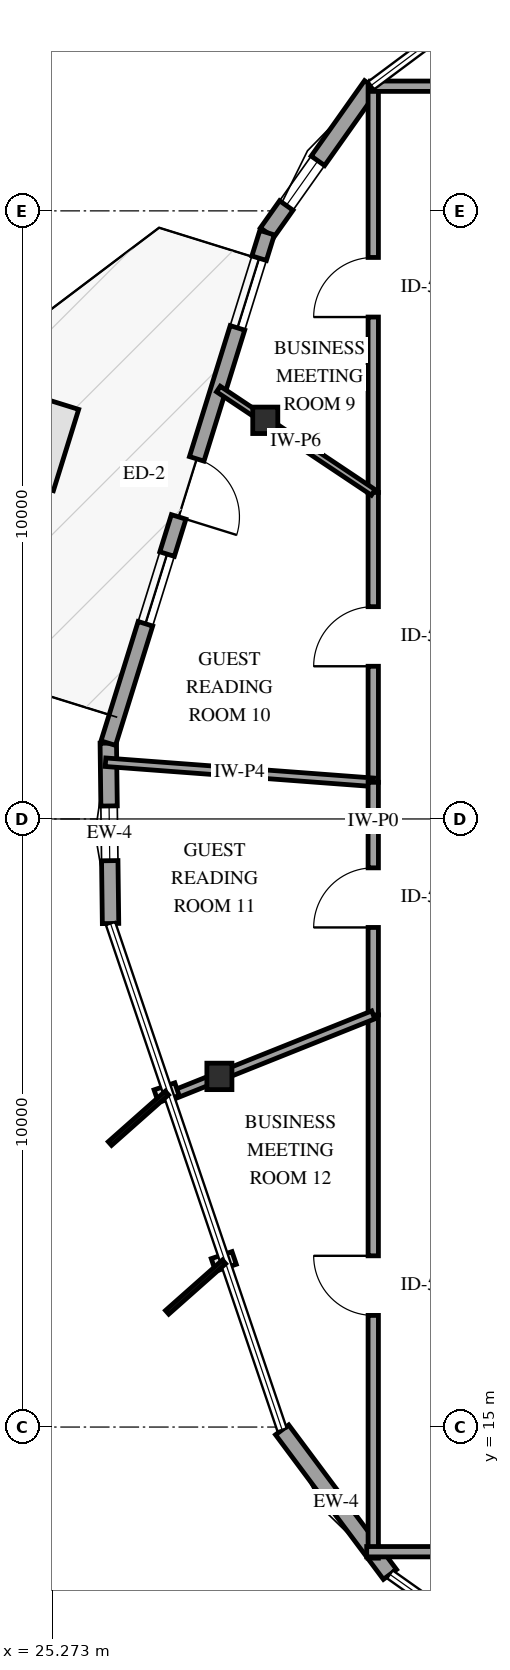
"""IFC4 building model, lengths in metres.
Left out: names, types, materials, properties, quantities, classifications, styles, units other than length and angle.
Written with IfcOpenShell. Run it as: python <this file> out.ifc"""

import sys

from ifc_helpers import new_model, si_unit, direction, frame, frame_2d, origin, origin_2d, place, context, subcontext, project, spatial, rectangle, i_section, extrude, element, fill, save


model = new_model("IFC4")
c1 = context("Model", 3, precision=1e-05, world=origin(), true_north=direction((0.0, 1.0)))
c2 = subcontext(c1, "Body", "Model", "MODEL_VIEW")
j1 = project(units=[si_unit("LENGTHUNIT", "METRE"), si_unit("PLANEANGLEUNIT", "RADIAN")], contexts=[c1])
p1 = place(None, origin())
s1 = spatial("IfcSite", under=j1, at=p1, CompositionType="ELEMENT")
p2 = place(p1, origin())
s2 = spatial("IfcBuilding", under=s1, at=p2, CompositionType="ELEMENT")
p3 = place(p2, frame((0.0, 0.0, 167.8)))
s3 = spatial("IfcBuildingStorey", under=s2, at=p3, CompositionType="ELEMENT", Elevation=167.8)
for number, where, z_axis, x_axis in (
    (1, (28.774, 31.556, 0.0), (0.0, 0.0, 1.0), (1.0, 0.0, 0.0)),
    (2, (28.02, 20.766, 0.0), (0.0, 0.0, 1.0), (1.0, 0.0, 0.0)),
):
    element("IfcColumn", number, at=place(p3, frame(where, z_axis=z_axis, x_axis=x_axis)), inside=s3, PredefinedType="COLUMN", context=c2, shape_type="SweptSolid", body=[
        extrude(i_section(OverallWidth=0.412, OverallDepth=0.435, WebThickness=0.036, FlangeThickness=0.057, FilletRadius=0.038, at=origin_2d()), origin(), (0.0, 0.0, 1.0), 3.6),
    ])
p4 = place(p3, frame((30.517, 37.064, 0.0), z_axis=(0.0, 0.0, 1.0), x_axis=(-0.577542313639, -0.816360751112, 0.0)))
e3 = element("IfcWall", 3, at=p4, inside=s3, PredefinedType="SOLIDWALL", context=c2, shape_type="SweptSolid", body=[
    extrude(rectangle(XDim=2.967, YDim=0.27, at=frame_2d((1.483, 0.0))), origin(), (0.0, 0.0, 1.0), 2.679),
])
p5 = place(p4, frame((1.519, 0.0, 0.75)))
e4 = element("IfcOpeningElement", 4, at=p5, cuts=e3, PredefinedType="OPENING", context=c2, shape_type="SweptSolid", body=[
    extrude(rectangle(XDim=0.9, YDim=1.5, at=frame_2d((0.45, 0.75))), frame((0.0, 0.145, 0.0), z_axis=(0.0, -1.0, 0.0), x_axis=(1.0, 0.0, 0.0)), (0.0, 0.0, 1.0), 0.29),
])
p6 = place(p3, frame((26.192, 26.247, 0.0), z_axis=(0.0, 0.0, 1.0), x_axis=(0.012591594286, -0.999920722734, 0.0)))
e5 = element("IfcWall", 5, at=p6, inside=s3, PredefinedType="SOLIDWALL", context=c2, shape_type="SweptSolid", body=[
    extrude(rectangle(XDim=2.967, YDim=0.27, at=frame_2d((1.483, 0.0))), origin(), (0.0, 0.0, 1.0), 2.679),
])
p7 = place(p6, frame((1.033, 0.0, 0.75)))
e6 = element("IfcOpeningElement", 6, at=p7, cuts=e5, PredefinedType="OPENING", context=c2, shape_type="SweptSolid", body=[
    extrude(rectangle(XDim=0.9, YDim=1.5, at=frame_2d((0.45, 0.75))), frame((0.0, 0.145, 0.0), z_axis=(0.0, -1.0, 0.0), x_axis=(1.0, 0.0, 0.0)), (0.0, 0.0, 1.0), 0.29),
])
p8 = place(p3, frame((28.804, 34.642, 0.0), z_axis=(0.0, 0.0, 1.0), x_axis=(-0.297052486457, -0.954861152362, 0.0)))
e7 = element("IfcWall", 7, at=p8, inside=s3, PredefinedType="SOLIDWALL", context=c2, shape_type="SweptSolid", body=[
    extrude(rectangle(XDim=8.792, YDim=0.25, at=frame_2d((4.396, 0.0))), origin(), (0.0, 0.0, 1.0), 2.679),
])
p9 = place(p8, frame((3.896, 0.0, 0.0)))
e8 = element("IfcOpeningElement", 8, at=p9, cuts=e7, PredefinedType="OPENING", context=c2, shape_type="SweptSolid", body=[
    extrude(rectangle(XDim=1.0, YDim=2.15, at=frame_2d((0.5, 1.075))), frame((0.0, 0.135, 0.0), z_axis=(0.0, -1.0, 0.0), x_axis=(1.0, 0.0, 0.0)), (0.0, 0.0, 1.0), 0.27),
])
p10 = place(p8, frame((0.44, 0.0, 0.72)))
e9 = element("IfcOpeningElement", 9, at=p10, cuts=e7, PredefinedType="OPENING", context=c2, shape_type="SweptSolid", body=[
    extrude(rectangle(XDim=1.2, YDim=1.6, at=frame_2d((0.6, 0.8))), frame((0.0, 0.135, 0.0), z_axis=(0.0, -1.0, 0.0), x_axis=(1.0, 0.0, 0.0)), (0.0, 0.0, 1.0), 0.27),
])
p11 = place(p8, frame((5.536, 0.0, 0.72)))
e10 = element("IfcOpeningElement", 10, at=p11, cuts=e7, PredefinedType="OPENING", context=c2, shape_type="SweptSolid", body=[
    extrude(rectangle(XDim=1.2, YDim=1.6, at=frame_2d((0.6, 0.8))), frame((0.0, 0.135, 0.0), z_axis=(0.0, -1.0, 0.0), x_axis=(1.0, 0.0, 0.0)), (0.0, 0.0, 1.0), 0.27),
])
p12 = place(p3, frame((29.052, 14.954, 0.0), z_axis=(0.0, 0.0, 1.0), x_axis=(0.597891104192, -0.80157733721, 0.0)))
e11 = element("IfcWall", 11, at=p12, inside=s3, PredefinedType="SOLIDWALL", context=c2, shape_type="SweptSolid", body=[
    extrude(rectangle(XDim=2.967, YDim=0.27, at=frame_2d((1.483, 0.0))), origin(), (0.0, 0.0, 1.0), 2.679),
])
p13 = place(p3, frame((30.55, 12.844, 0.0), z_axis=(0.0, 0.0, 1.0), x_axis=(0.0, 1.0, 0.0)))
e12 = element("IfcWall", 12, at=p13, inside=s3, PredefinedType="PARTITIONING", context=c2, shape_type="SweptSolid", body=[
    extrude(rectangle(XDim=8.934, YDim=0.17, at=frame_2d((4.467, 0.0))), origin(), (0.0, 0.0, 1.0), 3.3),
])
p14 = place(p13, frame((3.992, 0.0, 0.0)))
e13 = element("IfcOpeningElement", 13, at=p14, cuts=e12, PredefinedType="OPENING", context=c2, shape_type="SweptSolid", body=[
    extrude(rectangle(XDim=0.98, YDim=2.15, at=frame_2d((0.49, 1.075))), frame((0.0, 0.095, 0.0), z_axis=(0.0, -1.0, 0.0), x_axis=(1.0, 0.0, 0.0)), (0.0, 0.0, 1.0), 0.19),
])
p15 = place(p3, frame((38.405, 12.95, 0.0), z_axis=(0.0, 0.0, 1.0), x_axis=(-1.0, 0.0, 0.0)))
e14 = element("IfcWall", 14, at=p15, inside=s3, PredefinedType="PARTITIONING", context=c2, shape_type="SweptSolid", body=[
    extrude(rectangle(XDim=7.963, YDim=0.17, at=frame_2d((3.981, 0.0))), origin(), (0.0, 0.0, 1.0), 3.3),
])
p16 = place(p15, frame((0.719, 0.0, 0.0)))
e15 = element("IfcOpeningElement", 15, at=p16, cuts=e14, PredefinedType="OPENING", context=c2, shape_type="SweptSolid", body=[
    extrude(rectangle(XDim=0.98, YDim=2.15, at=frame_2d((0.49, 1.075))), frame((0.0, 0.095, 0.0), z_axis=(0.0, -1.0, 0.0), x_axis=(1.0, 0.0, 0.0)), (0.0, 0.0, 1.0), 0.19),
])
p17 = place(p3, frame((30.55, 30.37, 0.0), z_axis=(0.0, 0.0, 1.0), x_axis=(0.0, 1.0, 0.0)))
e16 = element("IfcWall", 16, at=p17, inside=s3, PredefinedType="PARTITIONING", context=c2, shape_type="SweptSolid", body=[
    extrude(rectangle(XDim=6.718, YDim=0.17, at=frame_2d((3.359, 0.0))), origin(), (0.0, 0.0, 1.0), 3.3),
])
p18 = place(p17, frame((2.884, 0.0, 0.0)))
e17 = element("IfcOpeningElement", 17, at=p18, cuts=e16, PredefinedType="OPENING", context=c2, shape_type="SweptSolid", body=[
    extrude(rectangle(XDim=0.98, YDim=2.15, at=frame_2d((0.49, 1.075))), frame((0.0, 0.095, 0.0), z_axis=(0.0, -1.0, 0.0), x_axis=(1.0, 0.0, 0.0)), (0.0, 0.0, 1.0), 0.19),
])
p19 = place(p3, frame((30.504, 37.05, 0.0), z_axis=(0.0, 0.0, 1.0), x_axis=(1.0, 0.0, 0.0)))
e18 = element("IfcWall", 18, at=p19, inside=s3, PredefinedType="PARTITIONING", context=c2, shape_type="SweptSolid", body=[
    extrude(rectangle(XDim=5.763, YDim=0.17, at=frame_2d((2.882, 0.0))), origin(), (0.0, 0.0, 1.0), 3.3),
])
p20 = place(p19, frame((2.407, 0.0, 0.0)))
e19 = element("IfcOpeningElement", 19, at=p20, cuts=e18, PredefinedType="OPENING", context=c2, shape_type="SweptSolid", body=[
    extrude(rectangle(XDim=0.98, YDim=2.15, at=frame_2d((0.49, 1.075))), frame((0.0, 0.095, 0.0), z_axis=(0.0, -1.0, 0.0), x_axis=(1.0, 0.0, 0.0)), (0.0, 0.0, 1.0), 0.19),
])
p21 = place(p3, frame((30.55, 25.603, 0.0), z_axis=(0.0, 0.0, 1.0), x_axis=(0.0, 1.0, 0.0)))
e20 = element("IfcWall", 20, at=p21, inside=s3, PredefinedType="PARTITIONING", context=c2, shape_type="SweptSolid", body=[
    extrude(rectangle(XDim=4.767, YDim=0.17, at=frame_2d((2.384, 0.0))), origin(), (0.0, 0.0, 1.0), 3.3),
])
p22 = place(p21, frame((1.908, 0.0, 0.0)))
e21 = element("IfcOpeningElement", 21, at=p22, cuts=e20, PredefinedType="OPENING", context=c2, shape_type="SweptSolid", body=[
    extrude(rectangle(XDim=0.98, YDim=2.15, at=frame_2d((0.49, 1.075))), frame((0.0, 0.095, 0.0), z_axis=(0.0, -1.0, 0.0), x_axis=(1.0, 0.0, 0.0)), (0.0, 0.0, 1.0), 0.19),
])
p23 = place(p3, frame((30.55, 25.603, 0.0), z_axis=(0.0, 0.0, 1.0), x_axis=(-0.997201886639, 0.074755583628, 0.0)))
e22 = element("IfcWall", 22, at=p23, inside=s3, PredefinedType="PARTITIONING", context=c2, shape_type="SweptSolid", body=[
    extrude(rectangle(XDim=4.416, YDim=0.14, at=frame_2d((2.208, 0.0))), origin(), (0.0, 0.0, 1.0), 3.3),
])
p24 = place(p3, frame((30.55, 21.778, 0.0), z_axis=(0.0, 0.0, 1.0), x_axis=(0.0, 1.0, 0.0)))
e23 = element("IfcWall", 23, at=p24, inside=s3, PredefinedType="PARTITIONING", context=c2, shape_type="SweptSolid", body=[
    extrude(rectangle(XDim=3.825, YDim=0.17, at=frame_2d((1.913, 0.0))), origin(), (0.0, 0.0, 1.0), 3.3),
])
p25 = place(p24, frame((1.438, 0.0, 0.0)))
e24 = element("IfcOpeningElement", 24, at=p25, cuts=e23, PredefinedType="OPENING", context=c2, shape_type="SweptSolid", body=[
    extrude(rectangle(XDim=0.98, YDim=2.15, at=frame_2d((0.49, 1.075))), frame((0.0, 0.095, 0.0), z_axis=(0.0, -1.0, 0.0), x_axis=(1.0, 0.0, 0.0)), (0.0, 0.0, 1.0), 0.19),
])
p26 = place(p3, frame((30.55, 21.778, 0.0), z_axis=(0.0, 0.0, 1.0), x_axis=(-0.928509296492, -0.371309151958, 0.0)))
e25 = element("IfcWall", 25, at=p26, inside=s3, PredefinedType="PARTITIONING", context=c2, shape_type="SweptSolid", body=[
    extrude(rectangle(XDim=3.614, YDim=0.14, at=frame_2d((1.807, 0.0))), origin(), (0.0, 0.0, 1.0), 3.3),
])
p27 = place(p3, frame((30.55, 30.37, 0.0), z_axis=(0.0, 0.0, 1.0), x_axis=(-0.831669772262, 0.555270555591, 0.0)))
e26 = element("IfcWall", 26, at=p27, inside=s3, PredefinedType="PARTITIONING", context=c2, shape_type="SweptSolid", body=[
    extrude(rectangle(XDim=3.062, YDim=0.11, at=frame_2d((1.531, 0.0))), origin(), (0.0, 0.0, 1.0), 3.3),
])
p28 = place(p5, origin())
e27 = element("IfcWindow", 27, at=p28, inside=s3, PartitioningType="SINGLE_PANEL", PredefinedType="WINDOW", context=c2, shape_type="SweptSolid", body=[
    extrude(rectangle(XDim=0.9, YDim=1.5, at=frame_2d((0.45, 0.75))), frame((0.0, 0.03, 0.0), z_axis=(0.0, -1.0, 0.0), x_axis=(1.0, 0.0, 0.0)), (0.0, 0.0, 1.0), 0.06),
])
fill(e4, e27)
p29 = place(p7, origin())
e28 = element("IfcWindow", 28, at=p29, inside=s3, PartitioningType="SINGLE_PANEL", PredefinedType="WINDOW", context=c2, shape_type="SweptSolid", body=[
    extrude(rectangle(XDim=0.9, YDim=1.5, at=frame_2d((0.45, 0.75))), frame((0.0, 0.03, 0.0), z_axis=(0.0, -1.0, 0.0), x_axis=(1.0, 0.0, 0.0)), (0.0, 0.0, 1.0), 0.06),
])
fill(e6, e28)
p30 = place(p9, origin())
e29 = element("IfcDoor", 29, at=p30, inside=s3, OperationType="SINGLE_SWING_RIGHT", PredefinedType="DOOR", context=c2, shape_type="SweptSolid", body=[
    extrude(rectangle(XDim=1.0, YDim=2.15, at=frame_2d((0.5, 1.075))), frame((0.0, 0.025, 0.0), z_axis=(0.0, -1.0, 0.0), x_axis=(1.0, 0.0, 0.0)), (0.0, 0.0, 1.0), 0.05),
])
fill(e8, e29)
p31 = place(p10, origin())
e30 = element("IfcWindow", 30, at=p31, inside=s3, PartitioningType="SINGLE_PANEL", PredefinedType="WINDOW", context=c2, shape_type="SweptSolid", body=[
    extrude(rectangle(XDim=1.2, YDim=1.6, at=frame_2d((0.6, 0.8))), frame((0.0, 0.03, 0.0), z_axis=(0.0, -1.0, 0.0), x_axis=(1.0, 0.0, 0.0)), (0.0, 0.0, 1.0), 0.06),
])
fill(e9, e30)
p32 = place(p11, origin())
e31 = element("IfcWindow", 31, at=p32, inside=s3, PartitioningType="SINGLE_PANEL", PredefinedType="WINDOW", context=c2, shape_type="SweptSolid", body=[
    extrude(rectangle(XDim=1.2, YDim=1.6, at=frame_2d((0.6, 0.8))), frame((0.0, 0.03, 0.0), z_axis=(0.0, -1.0, 0.0), x_axis=(1.0, 0.0, 0.0)), (0.0, 0.0, 1.0), 0.06),
])
fill(e10, e31)
p33 = place(p14, origin())
e32 = element("IfcDoor", 32, at=p33, inside=s3, OperationType="SINGLE_SWING_RIGHT", PredefinedType="DOOR", context=c2, shape_type="SweptSolid", body=[
    extrude(rectangle(XDim=0.98, YDim=2.15, at=frame_2d((0.49, 1.075))), frame((0.0, 0.025, 0.0), z_axis=(0.0, -1.0, 0.0), x_axis=(1.0, 0.0, 0.0)), (0.0, 0.0, 1.0), 0.05),
])
fill(e13, e32)
p34 = place(p18, origin())
e33 = element("IfcDoor", 33, at=p34, inside=s3, OperationType="SINGLE_SWING_LEFT", PredefinedType="DOOR", context=c2, shape_type="SweptSolid", body=[
    extrude(rectangle(XDim=0.98, YDim=2.15, at=frame_2d((0.49, 1.075))), frame((0.0, 0.025, 0.0), z_axis=(0.0, -1.0, 0.0), x_axis=(1.0, 0.0, 0.0)), (0.0, 0.0, 1.0), 0.05),
])
fill(e17, e33)
p35 = place(p22, origin())
e34 = element("IfcDoor", 34, at=p35, inside=s3, OperationType="SINGLE_SWING_LEFT", PredefinedType="DOOR", context=c2, shape_type="SweptSolid", body=[
    extrude(rectangle(XDim=0.98, YDim=2.15, at=frame_2d((0.49, 1.075))), frame((0.0, 0.025, 0.0), z_axis=(0.0, -1.0, 0.0), x_axis=(1.0, 0.0, 0.0)), (0.0, 0.0, 1.0), 0.05),
])
fill(e21, e34)
p36 = place(p25, origin())
e35 = element("IfcDoor", 35, at=p36, inside=s3, OperationType="SINGLE_SWING_LEFT", PredefinedType="DOOR", context=c2, shape_type="SweptSolid", body=[
    extrude(rectangle(XDim=0.98, YDim=2.15, at=frame_2d((0.49, 1.075))), frame((0.0, 0.025, 0.0), z_axis=(0.0, -1.0, 0.0), x_axis=(1.0, 0.0, 0.0)), (0.0, 0.0, 1.0), 0.05),
])
fill(e24, e35)
save(model, sys.argv[1])
